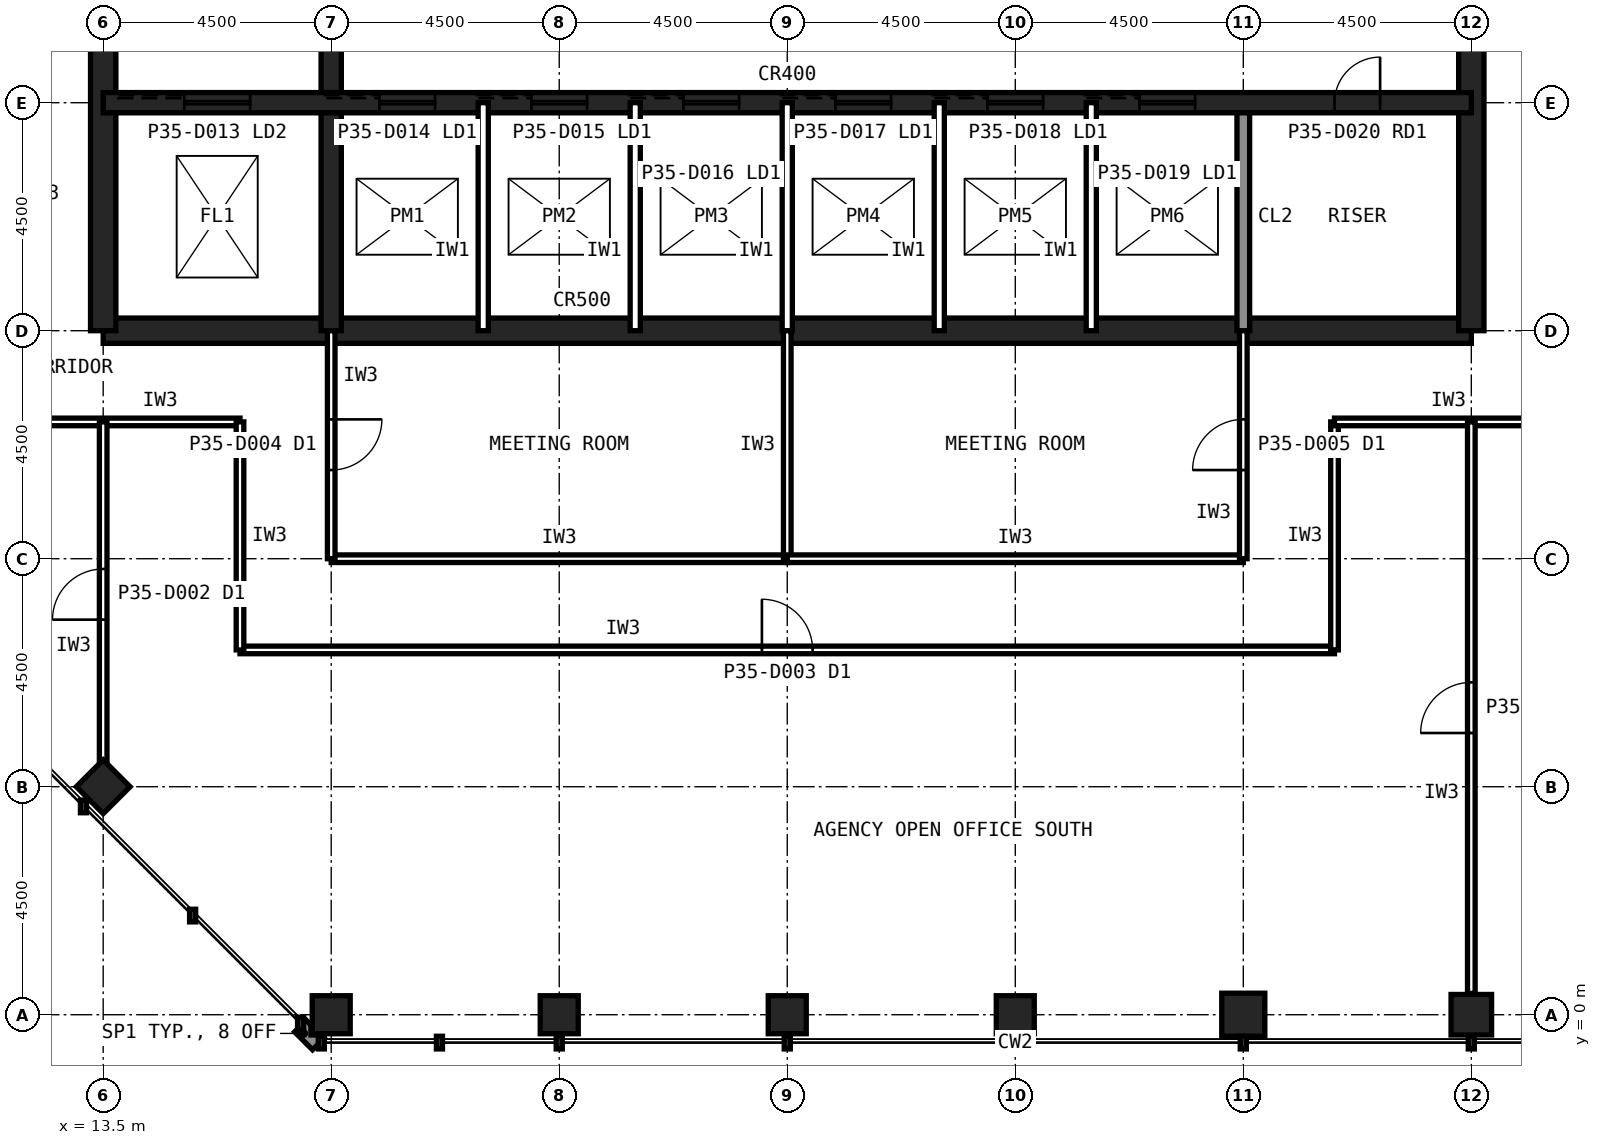
"""IFC4 building model, lengths in metres.
Left out: names, types, materials, properties, quantities, classifications, styles, units other than length and angle.
Written with IfcOpenShell. Run it as: python <this file> out.ifc"""

import sys

from ifc_helpers import new_model, si_unit, direction, frame, frame_2d, origin, origin_2d, place, context, subcontext, project, spatial, rectangle, hollow_rectangle, extrude, element, fill, save


model = new_model("IFC4")
c1 = context("Model", 3, precision=1e-05, world=origin(), true_north=direction((0.0, 1.0)))
c2 = subcontext(c1, "Body", "Model", "MODEL_VIEW")
j1 = project(units=[si_unit("LENGTHUNIT", "METRE"), si_unit("PLANEANGLEUNIT", "RADIAN")], contexts=[c1])
p1 = place(None, origin())
s1 = spatial("IfcSite", under=j1, at=p1, CompositionType="ELEMENT")
p2 = place(p1, origin())
s2 = spatial("IfcBuilding", under=s1, at=p2, CompositionType="ELEMENT")
p3 = place(p2, frame((0.0, 0.0, 151.6)))
s3 = spatial("IfcBuildingStorey", under=s2, at=p3, CompositionType="ELEMENT", Elevation=151.6)
for number, where, z_axis, x_axis in (
    (1, (18.0, 0.0, 0.0), (0.0, 0.0, 1.0), (1.0, 0.0, 0.0)),
    (2, (22.5, 0.0, 0.0), (0.0, 0.0, 1.0), (1.0, 0.0, 0.0)),
    (3, (27.0, 0.0, 0.0), (0.0, 0.0, 1.0), (1.0, 0.0, 0.0)),
    (4, (31.5, 0.0, 0.0), (0.0, 0.0, 1.0), (1.0, 0.0, 0.0)),
):
    element("IfcColumn", number, at=place(p3, frame(where, z_axis=z_axis, x_axis=x_axis)), inside=s3, PredefinedType="COLUMN", context=c2, shape_type="SweptSolid", body=[
        extrude(hollow_rectangle(XDim=0.75, YDim=0.75, WallThickness=0.04, at=origin_2d()), origin(), (0.0, 0.0, 1.0), 4.0),
    ])
p4 = place(p3, frame((36.0, 0.0, 0.0), z_axis=(0.0, 0.0, 1.0), x_axis=(1.0, 0.0, 0.0)))
e5 = element("IfcColumn", 5, at=p4, inside=s3, PredefinedType="COLUMN", context=c2, shape_type="SweptSolid", body=[
    extrude(hollow_rectangle(XDim=0.85, YDim=0.85, WallThickness=0.05, at=origin_2d()), origin(), (0.0, 0.0, 1.0), 4.0),
])
p5 = place(p3, frame((40.5, 0.0, 0.0), z_axis=(0.0, 0.0, 1.0), x_axis=(1.0, 0.0, 0.0)))
e6 = element("IfcColumn", 6, at=p5, inside=s3, PredefinedType="COLUMN", context=c2, shape_type="SweptSolid", body=[
    extrude(hollow_rectangle(XDim=0.8, YDim=0.8, WallThickness=0.045, at=origin_2d()), origin(), (0.0, 0.0, 1.0), 4.0),
])
p6 = place(p3, frame((13.5, 4.5, 0.0), z_axis=(0.0, 0.0, 1.0), x_axis=(0.707106781187, 0.707106781187, 0.0)))
e7 = element("IfcColumn", 7, at=p6, inside=s3, PredefinedType="COLUMN", context=c2, shape_type="SweptSolid", body=[
    extrude(hollow_rectangle(XDim=0.75, YDim=0.75, WallThickness=0.04, at=origin_2d()), origin(), (0.0, 0.0, 1.0), 4.0),
])
p7 = place(p3, frame((13.5, 13.5, 0.0), z_axis=(0.0, 0.0, 1.0), x_axis=(1.0, 0.0, 0.0)))
e8 = element("IfcWall", 8, at=p7, inside=s3, PredefinedType="SHEAR", context=c2, shape_type="SweptSolid", body=[
    extrude(rectangle(XDim=27.0, YDim=0.5, at=frame_2d((13.5, 0.0))), origin(), (0.0, 0.0, 1.0), 4.0),
])
p8 = place(p3, frame((40.5, 13.5, 0.0), z_axis=(0.0, 0.0, 1.0), x_axis=(0.0, 1.0, 0.0)))
e9 = element("IfcWall", 9, at=p8, inside=s3, PredefinedType="SHEAR", context=c2, shape_type="SweptSolid", body=[
    extrude(rectangle(XDim=27.0, YDim=0.5, at=frame_2d((13.5, 0.0))), origin(), (0.0, 0.0, 1.0), 4.0),
])
p9 = place(p8, frame((5.85, 0.0, 0.0)))
e10 = element("IfcOpeningElement", 10, at=p9, cuts=e9, PredefinedType="OPENING", context=c2, shape_type="SweptSolid", body=[
    extrude(rectangle(XDim=1.8, YDim=2.1, at=frame_2d((0.9, 1.05))), frame((0.0, 0.26, 0.0), z_axis=(0.0, -1.0, 0.0), x_axis=(1.0, 0.0, 0.0)), (0.0, 0.0, 1.0), 0.52),
])
p10 = place(p8, frame((19.65, 0.0, 0.0)))
e11 = element("IfcOpeningElement", 11, at=p10, cuts=e9, PredefinedType="OPENING", context=c2, shape_type="SweptSolid", body=[
    extrude(rectangle(XDim=1.2, YDim=2.1, at=frame_2d((0.6, 1.05))), frame((0.0, 0.26, 0.0), z_axis=(0.0, -1.0, 0.0), x_axis=(1.0, 0.0, 0.0)), (0.0, 0.0, 1.0), 0.52),
])
p11 = place(p3, frame((13.5, 40.5, 0.0), z_axis=(0.0, 0.0, 1.0), x_axis=(0.0, -1.0, 0.0)))
e12 = element("IfcWall", 12, at=p11, inside=s3, PredefinedType="SHEAR", context=c2, shape_type="SweptSolid", body=[
    extrude(rectangle(XDim=27.0, YDim=0.5, at=frame_2d((13.5, 0.0))), origin(), (0.0, 0.0, 1.0), 4.0),
])
p12 = place(p11, frame((19.65, 0.0, 0.0)))
e13 = element("IfcOpeningElement", 13, at=p12, cuts=e12, PredefinedType="OPENING", context=c2, shape_type="SweptSolid", body=[
    extrude(rectangle(XDim=1.2, YDim=2.1, at=frame_2d((0.6, 1.05))), frame((0.0, 0.26, 0.0), z_axis=(0.0, -1.0, 0.0), x_axis=(1.0, 0.0, 0.0)), (0.0, 0.0, 1.0), 0.52),
])
p13 = place(p11, frame((5.85, 0.0, 0.0)))
e14 = element("IfcOpeningElement", 14, at=p13, cuts=e12, PredefinedType="OPENING", context=c2, shape_type="SweptSolid", body=[
    extrude(rectangle(XDim=1.8, YDim=2.1, at=frame_2d((0.9, 1.05))), frame((0.0, 0.26, 0.0), z_axis=(0.0, -1.0, 0.0), x_axis=(1.0, 0.0, 0.0)), (0.0, 0.0, 1.0), 0.52),
])
p14 = place(p3, frame((18.0, 13.5, 0.0), z_axis=(0.0, 0.0, 1.0), x_axis=(0.0, 1.0, 0.0)))
e15 = element("IfcWall", 15, at=p14, inside=s3, PredefinedType="SHEAR", context=c2, shape_type="SweptSolid", body=[
    extrude(rectangle(XDim=18.0, YDim=0.4, at=frame_2d((9.0, 0.0))), origin(), (0.0, 0.0, 1.0), 4.0),
])
p15 = place(p3, frame((36.0, 13.5, 0.0), z_axis=(0.0, 0.0, 1.0), x_axis=(0.0, 1.0, 0.0)))
e16 = element("IfcWall", 16, at=p15, inside=s3, PredefinedType="SOLIDWALL", context=c2, shape_type="SweptSolid", body=[
    extrude(rectangle(XDim=4.5, YDim=0.25, at=frame_2d((2.25, 0.0))), origin(), (0.0, 0.0, 1.0), 3.84),
])
p16 = place(p3, frame((13.5, 18.0, 0.0), z_axis=(0.0, 0.0, 1.0), x_axis=(1.0, 0.0, 0.0)))
e17 = element("IfcWall", 17, at=p16, inside=s3, PredefinedType="SHEAR", context=c2, shape_type="SweptSolid", body=[
    extrude(rectangle(XDim=27.0, YDim=0.4, at=frame_2d((13.5, 0.0))), origin(), (0.0, 0.0, 1.0), 4.0),
])
p17 = place(p16, frame((24.3, 0.0, 0.0)))
e18 = element("IfcOpeningElement", 18, at=p17, cuts=e17, PredefinedType="OPENING", context=c2, shape_type="SweptSolid", body=[
    extrude(rectangle(XDim=0.9, YDim=2.1, at=frame_2d((0.45, 1.05))), frame((0.0, 0.21, 0.0), z_axis=(0.0, -1.0, 0.0), x_axis=(1.0, 0.0, 0.0)), (0.0, 0.0, 1.0), 0.42),
])
p18 = place(p16, frame((5.45, 0.0, 0.0)))
e19 = element("IfcOpeningElement", 19, at=p18, cuts=e17, PredefinedType="OPENING", context=c2, shape_type="SweptSolid", body=[
    extrude(rectangle(XDim=1.1, YDim=2.1, at=frame_2d((0.55, 1.05))), frame((0.0, 0.21, 0.0), z_axis=(0.0, -1.0, 0.0), x_axis=(1.0, 0.0, 0.0)), (0.0, 0.0, 1.0), 0.42),
])
p19 = place(p16, frame((8.45, 0.0, 0.0)))
e20 = element("IfcOpeningElement", 20, at=p19, cuts=e17, PredefinedType="OPENING", context=c2, shape_type="SweptSolid", body=[
    extrude(rectangle(XDim=1.1, YDim=2.1, at=frame_2d((0.55, 1.05))), frame((0.0, 0.21, 0.0), z_axis=(0.0, -1.0, 0.0), x_axis=(1.0, 0.0, 0.0)), (0.0, 0.0, 1.0), 0.42),
])
p20 = place(p16, frame((11.45, 0.0, 0.0)))
e21 = element("IfcOpeningElement", 21, at=p20, cuts=e17, PredefinedType="OPENING", context=c2, shape_type="SweptSolid", body=[
    extrude(rectangle(XDim=1.1, YDim=2.1, at=frame_2d((0.55, 1.05))), frame((0.0, 0.21, 0.0), z_axis=(0.0, -1.0, 0.0), x_axis=(1.0, 0.0, 0.0)), (0.0, 0.0, 1.0), 0.42),
])
p21 = place(p16, frame((14.45, 0.0, 0.0)))
e22 = element("IfcOpeningElement", 22, at=p21, cuts=e17, PredefinedType="OPENING", context=c2, shape_type="SweptSolid", body=[
    extrude(rectangle(XDim=1.1, YDim=2.1, at=frame_2d((0.55, 1.05))), frame((0.0, 0.21, 0.0), z_axis=(0.0, -1.0, 0.0), x_axis=(1.0, 0.0, 0.0)), (0.0, 0.0, 1.0), 0.42),
])
p22 = place(p16, frame((17.45, 0.0, 0.0)))
e23 = element("IfcOpeningElement", 23, at=p22, cuts=e17, PredefinedType="OPENING", context=c2, shape_type="SweptSolid", body=[
    extrude(rectangle(XDim=1.1, YDim=2.1, at=frame_2d((0.55, 1.05))), frame((0.0, 0.21, 0.0), z_axis=(0.0, -1.0, 0.0), x_axis=(1.0, 0.0, 0.0)), (0.0, 0.0, 1.0), 0.42),
])
p23 = place(p16, frame((20.45, 0.0, 0.0)))
e24 = element("IfcOpeningElement", 24, at=p23, cuts=e17, PredefinedType="OPENING", context=c2, shape_type="SweptSolid", body=[
    extrude(rectangle(XDim=1.1, YDim=2.1, at=frame_2d((0.55, 1.05))), frame((0.0, 0.21, 0.0), z_axis=(0.0, -1.0, 0.0), x_axis=(1.0, 0.0, 0.0)), (0.0, 0.0, 1.0), 0.42),
])
p24 = place(p16, frame((1.6, 0.0, 0.0)))
e25 = element("IfcOpeningElement", 25, at=p24, cuts=e17, PredefinedType="OPENING", context=c2, shape_type="SweptSolid", body=[
    extrude(rectangle(XDim=1.3, YDim=2.2, at=frame_2d((0.65, 1.1))), frame((0.0, 0.21, 0.0), z_axis=(0.0, -1.0, 0.0), x_axis=(1.0, 0.0, 0.0)), (0.0, 0.0, 1.0), 0.42),
])
for number, where, z_axis, x_axis in (
    (26, (21.0, 13.5, 0.0), (0.0, 0.0, 1.0), (0.0, 1.0, 0.0)),
    (27, (24.0, 13.5, 0.0), (0.0, 0.0, 1.0), (0.0, 1.0, 0.0)),
    (28, (27.0, 13.5, 0.0), (0.0, 0.0, 1.0), (0.0, 1.0, 0.0)),
    (29, (30.0, 13.5, 0.0), (0.0, 0.0, 1.0), (0.0, 1.0, 0.0)),
    (30, (33.0, 13.5, 0.0), (0.0, 0.0, 1.0), (0.0, 1.0, 0.0)),
):
    element("IfcWall", number, at=place(p3, frame(where, z_axis=z_axis, x_axis=x_axis)), inside=s3, PredefinedType="PARTITIONING", context=c2, shape_type="SweptSolid", body=[
        extrude(rectangle(XDim=4.5, YDim=0.2, at=frame_2d((2.25, 0.0))), origin(), (0.0, 0.0, 1.0), 3.84),
    ])
p25 = place(p3, frame((16.2, 7.2, 0.0), z_axis=(0.0, 0.0, 1.0), x_axis=(1.0, 0.0, 0.0)))
e31 = element("IfcWall", 31, at=p25, inside=s3, PredefinedType="PARTITIONING", context=c2, shape_type="SweptSolid", body=[
    extrude(rectangle(XDim=21.6, YDim=0.15, at=frame_2d((10.8, 0.0))), origin(), (0.0, 0.0, 1.0), 3.84),
])
p26 = place(p25, frame((10.3, 0.0, 0.0)))
e32 = element("IfcOpeningElement", 32, at=p26, cuts=e31, PredefinedType="OPENING", context=c2, shape_type="SweptSolid", body=[
    extrude(rectangle(XDim=1.0, YDim=2.1, at=frame_2d((0.5, 1.05))), frame((0.0, 0.085, 0.0), z_axis=(0.0, -1.0, 0.0), x_axis=(1.0, 0.0, 0.0)), (0.0, 0.0, 1.0), 0.17),
])
for number, where, z_axis, x_axis in (
    (33, (11.7, 11.7, 0.0), (0.0, 0.0, 1.0), (1.0, 0.0, 0.0)),
    (34, (16.2, 11.7, 0.0), (0.0, 0.0, 1.0), (0.0, -1.0, 0.0)),
    (35, (37.8, 7.2, 0.0), (0.0, 0.0, 1.0), (0.0, 1.0, 0.0)),
    (36, (37.8, 11.7, 0.0), (0.0, 0.0, 1.0), (1.0, 0.0, 0.0)),
):
    element("IfcWall", number, at=place(p3, frame(where, z_axis=z_axis, x_axis=x_axis)), inside=s3, PredefinedType="PARTITIONING", context=c2, shape_type="SweptSolid", body=[
        extrude(rectangle(XDim=4.5, YDim=0.15, at=frame_2d((2.25, 0.0))), origin(), (0.0, 0.0, 1.0), 3.84),
    ])
p27 = place(p3, frame((18.0, 9.0, 0.0), z_axis=(0.0, 0.0, 1.0), x_axis=(1.0, 0.0, 0.0)))
e37 = element("IfcWall", 37, at=p27, inside=s3, PredefinedType="PARTITIONING", context=c2, shape_type="SweptSolid", body=[
    extrude(rectangle(XDim=9.0, YDim=0.15, at=frame_2d((4.5, 0.0))), origin(), (0.0, 0.0, 1.0), 3.84),
])
p28 = place(p3, frame((27.0, 9.0, 0.0), z_axis=(0.0, 0.0, 1.0), x_axis=(0.0, 1.0, 0.0)))
e38 = element("IfcWall", 38, at=p28, inside=s3, PredefinedType="PARTITIONING", context=c2, shape_type="SweptSolid", body=[
    extrude(rectangle(XDim=4.5, YDim=0.15, at=frame_2d((2.25, 0.0))), origin(), (0.0, 0.0, 1.0), 2.989),
])
p29 = place(p3, frame((18.0, 13.5, 0.0), z_axis=(0.0, 0.0, 1.0), x_axis=(0.0, -1.0, 0.0)))
e39 = element("IfcWall", 39, at=p29, inside=s3, PredefinedType="PARTITIONING", context=c2, shape_type="SweptSolid", body=[
    extrude(rectangle(XDim=4.5, YDim=0.15, at=frame_2d((2.25, 0.0))), origin(), (0.0, 0.0, 1.0), 2.989),
])
p30 = place(p29, frame((1.75, 0.0, 0.0)))
e40 = element("IfcOpeningElement", 40, at=p30, cuts=e39, PredefinedType="OPENING", context=c2, shape_type="SweptSolid", body=[
    extrude(rectangle(XDim=1.0, YDim=2.1, at=frame_2d((0.5, 1.05))), frame((0.0, 0.085, 0.0), z_axis=(0.0, -1.0, 0.0), x_axis=(1.0, 0.0, 0.0)), (0.0, 0.0, 1.0), 0.17),
])
p31 = place(p3, frame((27.0, 9.0, 0.0), z_axis=(0.0, 0.0, 1.0), x_axis=(1.0, 0.0, 0.0)))
e41 = element("IfcWall", 41, at=p31, inside=s3, PredefinedType="PARTITIONING", context=c2, shape_type="SweptSolid", body=[
    extrude(rectangle(XDim=9.0, YDim=0.15, at=frame_2d((4.5, 0.0))), origin(), (0.0, 0.0, 1.0), 3.84),
])
p32 = place(p3, frame((36.0, 9.0, 0.0), z_axis=(0.0, 0.0, 1.0), x_axis=(0.0, 1.0, 0.0)))
e42 = element("IfcWall", 42, at=p32, inside=s3, PredefinedType="PARTITIONING", context=c2, shape_type="SweptSolid", body=[
    extrude(rectangle(XDim=4.5, YDim=0.15, at=frame_2d((2.25, 0.0))), origin(), (0.0, 0.0, 1.0), 2.989),
])
p33 = place(p32, frame((1.75, 0.0, 0.0)))
e43 = element("IfcOpeningElement", 43, at=p33, cuts=e42, PredefinedType="OPENING", context=c2, shape_type="SweptSolid", body=[
    extrude(rectangle(XDim=1.0, YDim=2.1, at=frame_2d((0.5, 1.05))), frame((0.0, 0.085, 0.0), z_axis=(0.0, -1.0, 0.0), x_axis=(1.0, 0.0, 0.0)), (0.0, 0.0, 1.0), 0.17),
])
p34 = place(p3, frame((40.5, 0.42, 0.0), z_axis=(0.0, 0.0, 1.0), x_axis=(0.0, 1.0, 0.0)))
e44 = element("IfcWall", 44, at=p34, inside=s3, PredefinedType="PARTITIONING", context=c2, shape_type="SweptSolid", body=[
    extrude(rectangle(XDim=11.28, YDim=0.15, at=frame_2d((5.64, 0.0))), origin(), (0.0, 0.0, 1.0), 2.989),
])
p35 = place(p34, frame((5.14, 0.0, 0.0)))
e45 = element("IfcOpeningElement", 45, at=p35, cuts=e44, PredefinedType="OPENING", context=c2, shape_type="SweptSolid", body=[
    extrude(rectangle(XDim=1.0, YDim=2.1, at=frame_2d((0.5, 1.05))), frame((0.0, 0.085, 0.0), z_axis=(0.0, -1.0, 0.0), x_axis=(1.0, 0.0, 0.0)), (0.0, 0.0, 1.0), 0.17),
])
p36 = place(p3, frame((13.5, 4.895, 0.0), z_axis=(0.0, 0.0, 1.0), x_axis=(0.0, 1.0, 0.0)))
e46 = element("IfcWall", 46, at=p36, inside=s3, PredefinedType="PARTITIONING", context=c2, shape_type="SweptSolid", body=[
    extrude(rectangle(XDim=6.805, YDim=0.15, at=frame_2d((3.402, 0.0))), origin(), (0.0, 0.0, 1.0), 2.989),
])
p37 = place(p36, frame((2.903, 0.0, 0.0)))
e47 = element("IfcOpeningElement", 47, at=p37, cuts=e46, PredefinedType="OPENING", context=c2, shape_type="SweptSolid", body=[
    extrude(rectangle(XDim=1.0, YDim=2.1, at=frame_2d((0.5, 1.05))), frame((0.0, 0.085, 0.0), z_axis=(0.0, -1.0, 0.0), x_axis=(1.0, 0.0, 0.0)), (0.0, 0.0, 1.0), 0.17),
])
p38 = place(p17, origin())
e48 = element("IfcDoor", 48, at=p38, inside=s3, OperationType="SINGLE_SWING_RIGHT", PredefinedType="DOOR", context=c2, shape_type="SweptSolid", body=[
    extrude(rectangle(XDim=0.9, YDim=2.1, at=frame_2d((0.45, 1.05))), frame((0.0, 0.025, 0.0), z_axis=(0.0, -1.0, 0.0), x_axis=(1.0, 0.0, 0.0)), (0.0, 0.0, 1.0), 0.05),
])
fill(e18, e48)
p39 = place(p18, origin())
e49 = element("IfcDoor", 49, at=p39, inside=s3, OperationType="SLIDING_TO_LEFT", PredefinedType="DOOR", context=c2, shape_type="SweptSolid", body=[
    extrude(rectangle(XDim=1.1, YDim=2.1, at=frame_2d((0.55, 1.05))), frame((0.0, 0.025, 0.0), z_axis=(0.0, -1.0, 0.0), x_axis=(1.0, 0.0, 0.0)), (0.0, 0.0, 1.0), 0.05),
])
fill(e19, e49)
p40 = place(p19, origin())
e50 = element("IfcDoor", 50, at=p40, inside=s3, OperationType="SLIDING_TO_LEFT", PredefinedType="DOOR", context=c2, shape_type="SweptSolid", body=[
    extrude(rectangle(XDim=1.1, YDim=2.1, at=frame_2d((0.55, 1.05))), frame((0.0, 0.025, 0.0), z_axis=(0.0, -1.0, 0.0), x_axis=(1.0, 0.0, 0.0)), (0.0, 0.0, 1.0), 0.05),
])
fill(e20, e50)
p41 = place(p20, origin())
e51 = element("IfcDoor", 51, at=p41, inside=s3, OperationType="SLIDING_TO_LEFT", PredefinedType="DOOR", context=c2, shape_type="SweptSolid", body=[
    extrude(rectangle(XDim=1.1, YDim=2.1, at=frame_2d((0.55, 1.05))), frame((0.0, 0.025, 0.0), z_axis=(0.0, -1.0, 0.0), x_axis=(1.0, 0.0, 0.0)), (0.0, 0.0, 1.0), 0.05),
])
fill(e21, e51)
p42 = place(p21, origin())
e52 = element("IfcDoor", 52, at=p42, inside=s3, OperationType="SLIDING_TO_LEFT", PredefinedType="DOOR", context=c2, shape_type="SweptSolid", body=[
    extrude(rectangle(XDim=1.1, YDim=2.1, at=frame_2d((0.55, 1.05))), frame((0.0, 0.025, 0.0), z_axis=(0.0, -1.0, 0.0), x_axis=(1.0, 0.0, 0.0)), (0.0, 0.0, 1.0), 0.05),
])
fill(e22, e52)
p43 = place(p22, origin())
e53 = element("IfcDoor", 53, at=p43, inside=s3, OperationType="SLIDING_TO_LEFT", PredefinedType="DOOR", context=c2, shape_type="SweptSolid", body=[
    extrude(rectangle(XDim=1.1, YDim=2.1, at=frame_2d((0.55, 1.05))), frame((0.0, 0.025, 0.0), z_axis=(0.0, -1.0, 0.0), x_axis=(1.0, 0.0, 0.0)), (0.0, 0.0, 1.0), 0.05),
])
fill(e23, e53)
p44 = place(p23, origin())
e54 = element("IfcDoor", 54, at=p44, inside=s3, OperationType="SLIDING_TO_LEFT", PredefinedType="DOOR", context=c2, shape_type="SweptSolid", body=[
    extrude(rectangle(XDim=1.1, YDim=2.1, at=frame_2d((0.55, 1.05))), frame((0.0, 0.025, 0.0), z_axis=(0.0, -1.0, 0.0), x_axis=(1.0, 0.0, 0.0)), (0.0, 0.0, 1.0), 0.05),
])
fill(e24, e54)
p45 = place(p24, origin())
e55 = element("IfcDoor", 55, at=p45, inside=s3, OperationType="SLIDING_TO_LEFT", PredefinedType="DOOR", context=c2, shape_type="SweptSolid", body=[
    extrude(rectangle(XDim=1.3, YDim=2.2, at=frame_2d((0.65, 1.1))), frame((0.0, 0.025, 0.0), z_axis=(0.0, -1.0, 0.0), x_axis=(1.0, 0.0, 0.0)), (0.0, 0.0, 1.0), 0.05),
])
fill(e25, e55)
p46 = place(p26, origin())
e56 = element("IfcDoor", 56, at=p46, inside=s3, OperationType="SINGLE_SWING_LEFT", PredefinedType="DOOR", context=c2, shape_type="SweptSolid", body=[
    extrude(rectangle(XDim=1.0, YDim=2.1, at=frame_2d((0.5, 1.05))), frame((0.0, 0.025, 0.0), z_axis=(0.0, -1.0, 0.0), x_axis=(1.0, 0.0, 0.0)), (0.0, 0.0, 1.0), 0.05),
])
fill(e32, e56)
p47 = place(p30, origin())
e57 = element("IfcDoor", 57, at=p47, inside=s3, OperationType="SINGLE_SWING_LEFT", PredefinedType="DOOR", context=c2, shape_type="SweptSolid", body=[
    extrude(rectangle(XDim=1.0, YDim=2.1, at=frame_2d((0.5, 1.05))), frame((0.0, 0.025, 0.0), z_axis=(0.0, -1.0, 0.0), x_axis=(1.0, 0.0, 0.0)), (0.0, 0.0, 1.0), 0.05),
])
fill(e40, e57)
p48 = place(p33, origin())
e58 = element("IfcDoor", 58, at=p48, inside=s3, OperationType="SINGLE_SWING_LEFT", PredefinedType="DOOR", context=c2, shape_type="SweptSolid", body=[
    extrude(rectangle(XDim=1.0, YDim=2.1, at=frame_2d((0.5, 1.05))), frame((0.0, 0.025, 0.0), z_axis=(0.0, -1.0, 0.0), x_axis=(1.0, 0.0, 0.0)), (0.0, 0.0, 1.0), 0.05),
])
fill(e43, e58)
p49 = place(p35, origin())
e59 = element("IfcDoor", 59, at=p49, inside=s3, OperationType="SINGLE_SWING_LEFT", PredefinedType="DOOR", context=c2, shape_type="SweptSolid", body=[
    extrude(rectangle(XDim=1.0, YDim=2.1, at=frame_2d((0.5, 1.05))), frame((0.0, 0.025, 0.0), z_axis=(0.0, -1.0, 0.0), x_axis=(1.0, 0.0, 0.0)), (0.0, 0.0, 1.0), 0.05),
])
fill(e45, e59)
p50 = place(p37, origin())
e60 = element("IfcDoor", 60, at=p50, inside=s3, OperationType="SINGLE_SWING_LEFT", PredefinedType="DOOR", context=c2, shape_type="SweptSolid", body=[
    extrude(rectangle(XDim=1.0, YDim=2.1, at=frame_2d((0.5, 1.05))), frame((0.0, 0.025, 0.0), z_axis=(0.0, -1.0, 0.0), x_axis=(1.0, 0.0, 0.0)), (0.0, 0.0, 1.0), 0.05),
])
fill(e47, e60)
save(model, sys.argv[1])
